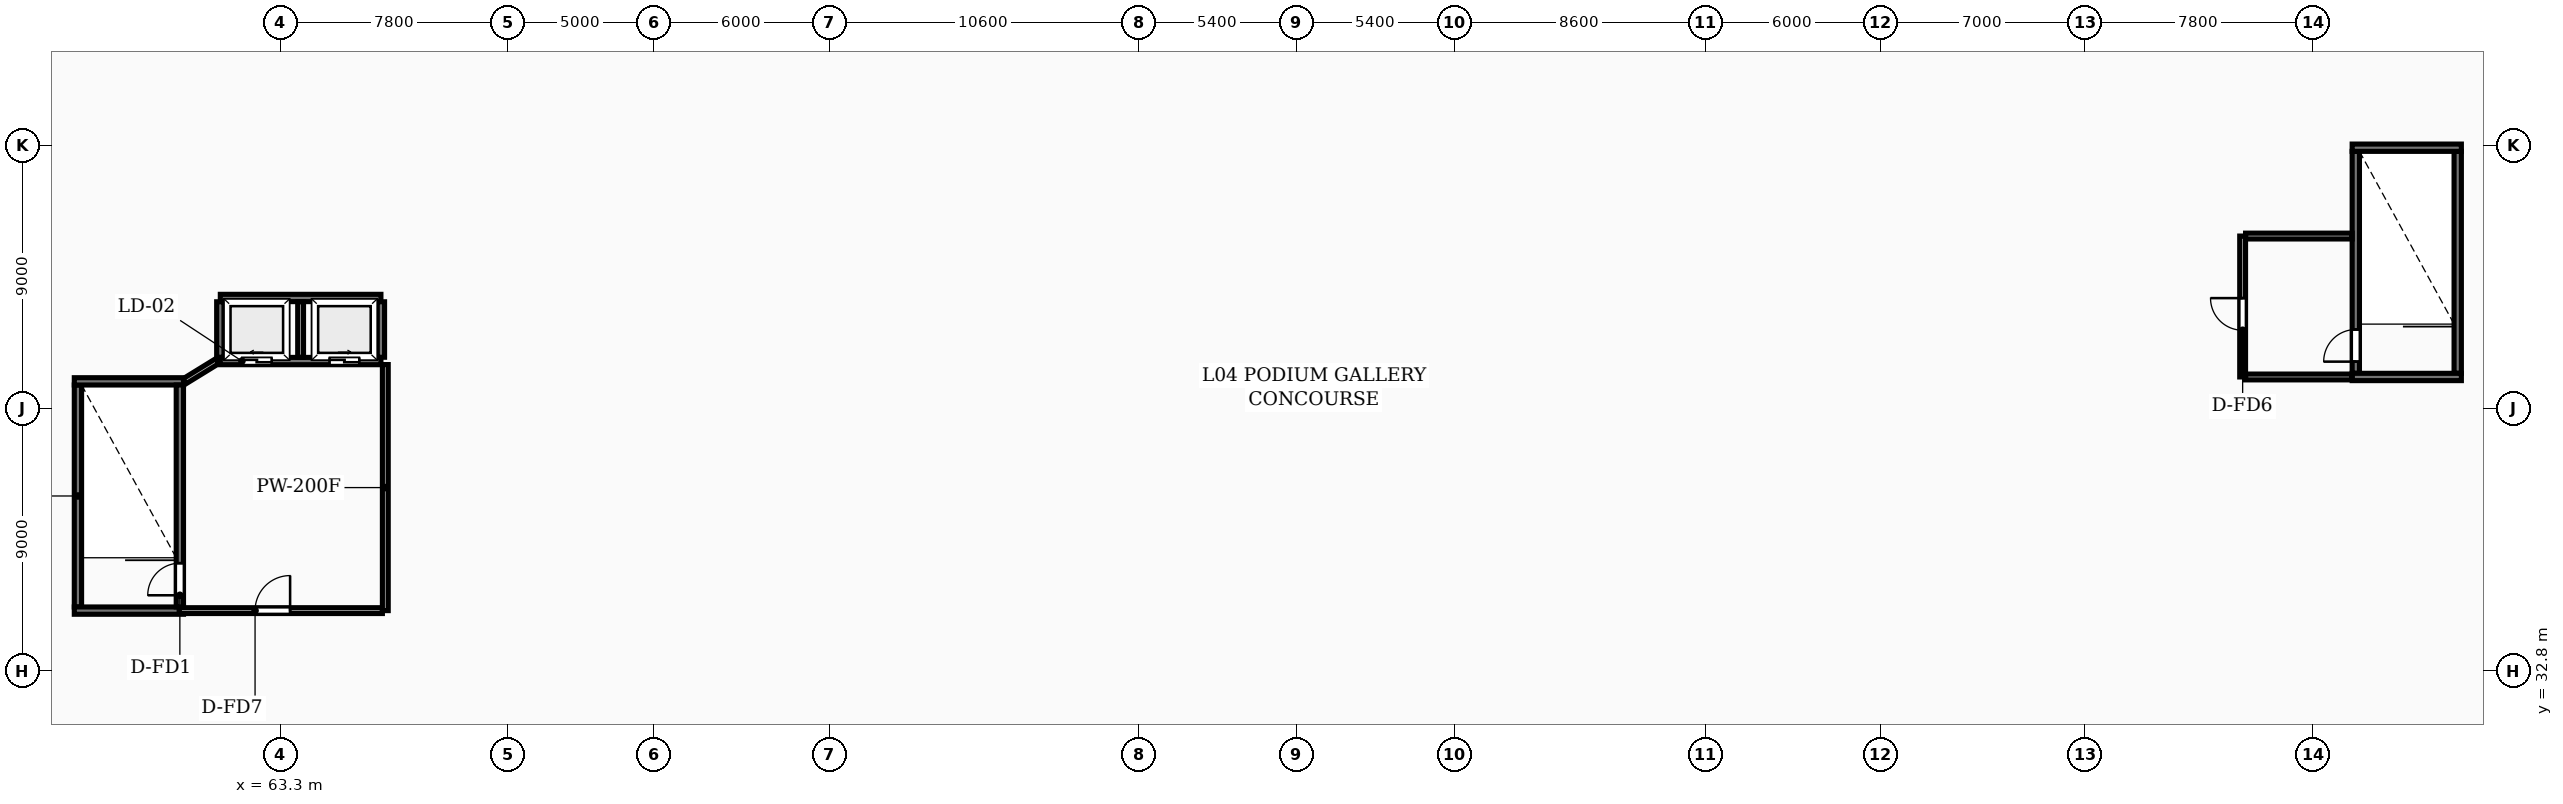
"""IFC4 building model, lengths in metres.
Left out: names, types, materials, properties, quantities, classifications, styles, units other than length and angle.
Written with IfcOpenShell. Run it as: python <this file> out.ifc"""

import sys

from ifc_helpers import new_model, si_unit, direction, frame, frame_2d, origin, place, context, subcontext, project, spatial, rectangle, extrude, element, fill, save


model = new_model("IFC4")
c1 = context("Model", 3, precision=1e-05, world=origin(), true_north=direction((0.0, 1.0)))
c2 = subcontext(c1, "Body", "Model", "MODEL_VIEW")
j1 = project(units=[si_unit("LENGTHUNIT", "METRE"), si_unit("PLANEANGLEUNIT", "RADIAN")], contexts=[c1])
p1 = place(None, origin())
s1 = spatial("IfcSite", under=j1, at=p1, CompositionType="ELEMENT")
p2 = place(p1, origin())
s2 = spatial("IfcBuilding", under=s1, at=p2, CompositionType="ELEMENT")
p3 = place(p2, frame((0.0, 0.0, 19.0)))
s3 = spatial("IfcBuildingStorey", under=s2, at=p3, CompositionType="ELEMENT", Elevation=19.0)
p4 = place(p3, frame((56.375, 35.0, 0.0), z_axis=(0.0, 0.0, 1.0), x_axis=(0.0, 1.0, 0.0)))
e1 = element("IfcWall", 1, at=p4, inside=s3, PredefinedType="SHEAR", context=c2, shape_type="SweptSolid", body=[
    extrude(rectangle(XDim=7.6, YDim=0.25, at=frame_2d((3.8, 0.0))), origin(), (0.0, 0.0, 1.0), 5.0),
])
for number, where, z_axis, x_axis in (
    (2, (56.25, 42.725, 0.0), (0.0, 0.0, 1.0), (1.0, 0.0, 0.0)),
    (3, (56.25, 34.875, 0.0), (0.0, 0.0, 1.0), (1.0, 0.0, 0.0)),
):
    element("IfcWall", number, at=place(p3, frame(where, z_axis=z_axis, x_axis=x_axis)), inside=s3, PredefinedType="SHEAR", context=c2, shape_type="SweptSolid", body=[
        extrude(rectangle(XDim=3.74, YDim=0.25, at=frame_2d((1.87, 0.0))), origin(), (0.0, 0.0, 1.0), 5.0),
    ])
p5 = place(p3, frame((59.865, 35.0, 0.0), z_axis=(0.0, 0.0, 1.0), x_axis=(0.0, 1.0, 0.0)))
e4 = element("IfcWall", 4, at=p5, inside=s3, PredefinedType="SHEAR", context=c2, shape_type="SweptSolid", body=[
    extrude(rectangle(XDim=7.6, YDim=0.25, at=frame_2d((3.8, 0.0))), origin(), (0.0, 0.0, 1.0), 5.0),
])
p6 = place(p5, frame((0.4, 0.0, 0.0)))
e5 = element("IfcOpeningElement", 5, at=p6, cuts=e4, PredefinedType="OPENING", context=c2, shape_type="SweptSolid", body=[
    extrude(rectangle(XDim=1.1, YDim=2.1, at=frame_2d((0.55, 1.05))), frame((0.0, 0.135, 0.0), z_axis=(0.0, -1.0, 0.0), x_axis=(1.0, 0.0, 0.0)), (0.0, 0.0, 1.0), 0.27),
])
p7 = place(p3, frame((61.25, 43.42, 0.0), z_axis=(0.0, 0.0, 1.0), x_axis=(1.0, 0.0, 0.0)))
e6 = element("IfcWall", 6, at=p7, inside=s3, PredefinedType="SHEAR", context=c2, shape_type="SweptSolid", body=[
    extrude(rectangle(XDim=5.5, YDim=0.25, at=frame_2d((2.75, 0.0))), origin(), (0.0, 0.0, 1.0), 5.0),
])
p8 = place(p7, frame((0.74, 0.0, 0.0)))
e7 = element("IfcOpeningElement", 7, at=p8, cuts=e6, PredefinedType="OPENING", context=c2, shape_type="SweptSolid", body=[
    extrude(rectangle(XDim=1.02, YDim=2.12, at=frame_2d((0.51, 1.06))), frame((0.0, 0.135, 0.0), z_axis=(0.0, -1.0, 0.0), x_axis=(1.0, 0.0, 0.0)), (0.0, 0.0, 1.0), 0.27),
])
p9 = place(p7, frame((3.74, 0.0, 0.0)))
e8 = element("IfcOpeningElement", 8, at=p9, cuts=e6, PredefinedType="OPENING", context=c2, shape_type="SweptSolid", body=[
    extrude(rectangle(XDim=1.02, YDim=2.12, at=frame_2d((0.51, 1.06))), frame((0.0, 0.135, 0.0), z_axis=(0.0, -1.0, 0.0), x_axis=(1.0, 0.0, 0.0)), (0.0, 0.0, 1.0), 0.27),
])
p10 = place(p3, frame((61.25, 45.58, 0.0), z_axis=(0.0, 0.0, 1.0), x_axis=(1.0, 0.0, 0.0)))
e9 = element("IfcWall", 9, at=p10, inside=s3, PredefinedType="SHEAR", context=c2, shape_type="SweptSolid", body=[
    extrude(rectangle(XDim=5.5, YDim=0.25, at=frame_2d((2.75, 0.0))), origin(), (0.0, 0.0, 1.0), 5.0),
])
for number, where, z_axis, x_axis in (
    (10, (61.25, 43.55, 0.0), (0.0, 0.0, 1.0), (0.0, 1.0, 0.0)),
    (11, (66.75, 43.55, 0.0), (0.0, 0.0, 1.0), (0.0, 1.0, 0.0)),
):
    element("IfcWall", number, at=place(p3, frame(where, z_axis=z_axis, x_axis=x_axis)), inside=s3, PredefinedType="SHEAR", context=c2, shape_type="SweptSolid", body=[
        extrude(rectangle(XDim=1.9, YDim=0.25, at=frame_2d((0.95, 0.0))), origin(), (0.0, 0.0, 1.0), 5.0),
    ])
p11 = place(p3, frame((64.0, 43.55, 0.0), z_axis=(0.0, 0.0, 1.0), x_axis=(0.0, 1.0, 0.0)))
e12 = element("IfcWall", 12, at=p11, inside=s3, PredefinedType="PARTITIONING", context=c2, shape_type="SweptSolid", body=[
    extrude(rectangle(XDim=1.9, YDim=0.2, at=frame_2d((0.95, 0.0))), origin(), (0.0, 0.0, 1.0), 4.68),
])
p12 = place(p3, frame((59.84, 34.875, 0.0), z_axis=(0.0, 0.0, 1.0), x_axis=(1.0, 0.0, 0.0)))
e13 = element("IfcWall", 13, at=p12, inside=s3, PredefinedType="PARTITIONING", context=c2, shape_type="SweptSolid", body=[
    extrude(rectangle(XDim=6.96, YDim=0.2, at=frame_2d((3.48, 0.0))), origin(), (0.0, 0.0, 1.0), 4.68),
])
p13 = place(p12, frame((2.6, 0.0, 0.0)))
e14 = element("IfcOpeningElement", 14, at=p13, cuts=e13, PredefinedType="OPENING", context=c2, shape_type="SweptSolid", body=[
    extrude(rectangle(XDim=1.2, YDim=2.18, at=frame_2d((0.6, 1.09))), frame((0.0, 0.11, 0.0), z_axis=(0.0, -1.0, 0.0), x_axis=(1.0, 0.0, 0.0)), (0.0, 0.0, 1.0), 0.22),
])
p14 = place(p3, frame((66.9, 34.875, 0.0), z_axis=(0.0, 0.0, 1.0), x_axis=(0.0, 1.0, 0.0)))
e15 = element("IfcWall", 15, at=p14, inside=s3, PredefinedType="PARTITIONING", context=c2, shape_type="SweptSolid", body=[
    extrude(rectangle(XDim=8.425, YDim=0.2, at=frame_2d((4.212, 0.0))), origin(), (0.0, 0.0, 1.0), 4.68),
])
p15 = place(p3, frame((60.02, 42.725, 0.0), z_axis=(0.0, 0.0, 1.0), x_axis=(0.851822584555, 0.523830396638, 0.0)))
e16 = element("IfcWall", 16, at=p15, inside=s3, PredefinedType="PARTITIONING", context=c2, shape_type="SweptSolid", body=[
    extrude(rectangle(XDim=1.326, YDim=0.2, at=frame_2d((0.663, 0.0))), origin(), (0.0, 0.0, 1.0), 4.68),
])
p16 = place(p3, frame((134.375, 43.0, 0.0), z_axis=(0.0, 0.0, 1.0), x_axis=(0.0, 1.0, 0.0)))
e17 = element("IfcWall", 17, at=p16, inside=s3, PredefinedType="SHEAR", context=c2, shape_type="SweptSolid", body=[
    extrude(rectangle(XDim=7.6, YDim=0.25, at=frame_2d((3.8, 0.0))), origin(), (0.0, 0.0, 1.0), 5.0),
])
p17 = place(p16, frame((0.4, 0.0, 0.0)))
e18 = element("IfcOpeningElement", 18, at=p17, cuts=e17, PredefinedType="OPENING", context=c2, shape_type="SweptSolid", body=[
    extrude(rectangle(XDim=1.1, YDim=2.1, at=frame_2d((0.55, 1.05))), frame((0.0, 0.135, 0.0), z_axis=(0.0, -1.0, 0.0), x_axis=(1.0, 0.0, 0.0)), (0.0, 0.0, 1.0), 0.27),
])
p18 = place(p3, frame((137.865, 43.0, 0.0), z_axis=(0.0, 0.0, 1.0), x_axis=(0.0, 1.0, 0.0)))
e19 = element("IfcWall", 19, at=p18, inside=s3, PredefinedType="SHEAR", context=c2, shape_type="SweptSolid", body=[
    extrude(rectangle(XDim=7.6, YDim=0.25, at=frame_2d((3.8, 0.0))), origin(), (0.0, 0.0, 1.0), 5.0),
])
for number, where, z_axis, x_axis in (
    (20, (134.25, 42.875, 0.0), (0.0, 0.0, 1.0), (1.0, 0.0, 0.0)),
    (21, (134.25, 50.725, 0.0), (0.0, 0.0, 1.0), (1.0, 0.0, 0.0)),
):
    element("IfcWall", number, at=place(p3, frame(where, z_axis=z_axis, x_axis=x_axis)), inside=s3, PredefinedType="SHEAR", context=c2, shape_type="SweptSolid", body=[
        extrude(rectangle(XDim=3.74, YDim=0.25, at=frame_2d((1.87, 0.0))), origin(), (0.0, 0.0, 1.0), 5.0),
    ])
p19 = place(p3, frame((130.5, 42.875, 0.0), z_axis=(0.0, 0.0, 1.0), x_axis=(0.0, 1.0, 0.0)))
e22 = element("IfcWall", 22, at=p19, inside=s3, PredefinedType="PARTITIONING", context=c2, shape_type="SweptSolid", body=[
    extrude(rectangle(XDim=4.825, YDim=0.2, at=frame_2d((2.413, 0.0))), origin(), (0.0, 0.0, 1.0), 4.68),
])
p20 = place(p19, frame((1.6, 0.0, 0.0)))
e23 = element("IfcOpeningElement", 23, at=p20, cuts=e22, PredefinedType="OPENING", context=c2, shape_type="SweptSolid", body=[
    extrude(rectangle(XDim=1.1, YDim=2.15, at=frame_2d((0.55, 1.075))), frame((0.0, 0.11, 0.0), z_axis=(0.0, -1.0, 0.0), x_axis=(1.0, 0.0, 0.0)), (0.0, 0.0, 1.0), 0.22),
])
for number, where, z_axis, x_axis in (
    (24, (130.6, 42.875, 0.0), (0.0, 0.0, 1.0), (1.0, 0.0, 0.0)),
    (25, (130.6, 47.7, 0.0), (0.0, 0.0, 1.0), (1.0, 0.0, 0.0)),
):
    element("IfcWall", number, at=place(p3, frame(where, z_axis=z_axis, x_axis=x_axis)), inside=s3, PredefinedType="PARTITIONING", context=c2, shape_type="SweptSolid", body=[
        extrude(rectangle(XDim=3.65, YDim=0.2, at=frame_2d((1.825, 0.0))), origin(), (0.0, 0.0, 1.0), 4.68),
    ])
p21 = place(p6, origin())
e26 = element("IfcDoor", 26, at=p21, inside=s3, OperationType="SINGLE_SWING_LEFT", PredefinedType="DOOR", context=c2, shape_type="SweptSolid", body=[
    extrude(rectangle(XDim=1.1, YDim=2.1, at=frame_2d((0.55, 1.05))), frame((0.0, 0.025, 0.0), z_axis=(0.0, -1.0, 0.0), x_axis=(1.0, 0.0, 0.0)), (0.0, 0.0, 1.0), 0.05),
])
fill(e5, e26)
p22 = place(p8, origin())
e27 = element("IfcDoor", 27, at=p22, inside=s3, OperationType="SLIDING_TO_LEFT", PredefinedType="DOOR", context=c2, shape_type="SweptSolid", body=[
    extrude(rectangle(XDim=1.02, YDim=2.12, at=frame_2d((0.51, 1.06))), frame((0.0, 0.025, 0.0), z_axis=(0.0, -1.0, 0.0), x_axis=(1.0, 0.0, 0.0)), (0.0, 0.0, 1.0), 0.05),
])
fill(e7, e27)
p23 = place(p9, origin())
e28 = element("IfcDoor", 28, at=p23, inside=s3, OperationType="SLIDING_TO_RIGHT", PredefinedType="DOOR", context=c2, shape_type="SweptSolid", body=[
    extrude(rectangle(XDim=1.02, YDim=2.12, at=frame_2d((0.51, 1.06))), frame((0.0, 0.025, 0.0), z_axis=(0.0, -1.0, 0.0), x_axis=(1.0, 0.0, 0.0)), (0.0, 0.0, 1.0), 0.05),
])
fill(e8, e28)
p24 = place(p13, origin())
e29 = element("IfcDoor", 29, at=p24, inside=s3, OperationType="SINGLE_SWING_RIGHT", PredefinedType="DOOR", context=c2, shape_type="SweptSolid", body=[
    extrude(rectangle(XDim=1.2, YDim=2.18, at=frame_2d((0.6, 1.09))), frame((0.0, 0.025, 0.0), z_axis=(0.0, -1.0, 0.0), x_axis=(1.0, 0.0, 0.0)), (0.0, 0.0, 1.0), 0.05),
])
fill(e14, e29)
p25 = place(p17, origin())
e30 = element("IfcDoor", 30, at=p25, inside=s3, OperationType="SINGLE_SWING_LEFT", PredefinedType="DOOR", context=c2, shape_type="SweptSolid", body=[
    extrude(rectangle(XDim=1.1, YDim=2.1, at=frame_2d((0.55, 1.05))), frame((0.0, 0.025, 0.0), z_axis=(0.0, -1.0, 0.0), x_axis=(1.0, 0.0, 0.0)), (0.0, 0.0, 1.0), 0.05),
])
fill(e18, e30)
p26 = place(p20, origin())
e31 = element("IfcDoor", 31, at=p26, inside=s3, OperationType="SINGLE_SWING_RIGHT", PredefinedType="DOOR", context=c2, shape_type="SweptSolid", body=[
    extrude(rectangle(XDim=1.1, YDim=2.15, at=frame_2d((0.55, 1.075))), frame((0.0, 0.025, 0.0), z_axis=(0.0, -1.0, 0.0), x_axis=(1.0, 0.0, 0.0)), (0.0, 0.0, 1.0), 0.05),
])
fill(e23, e31)
save(model, sys.argv[1])
